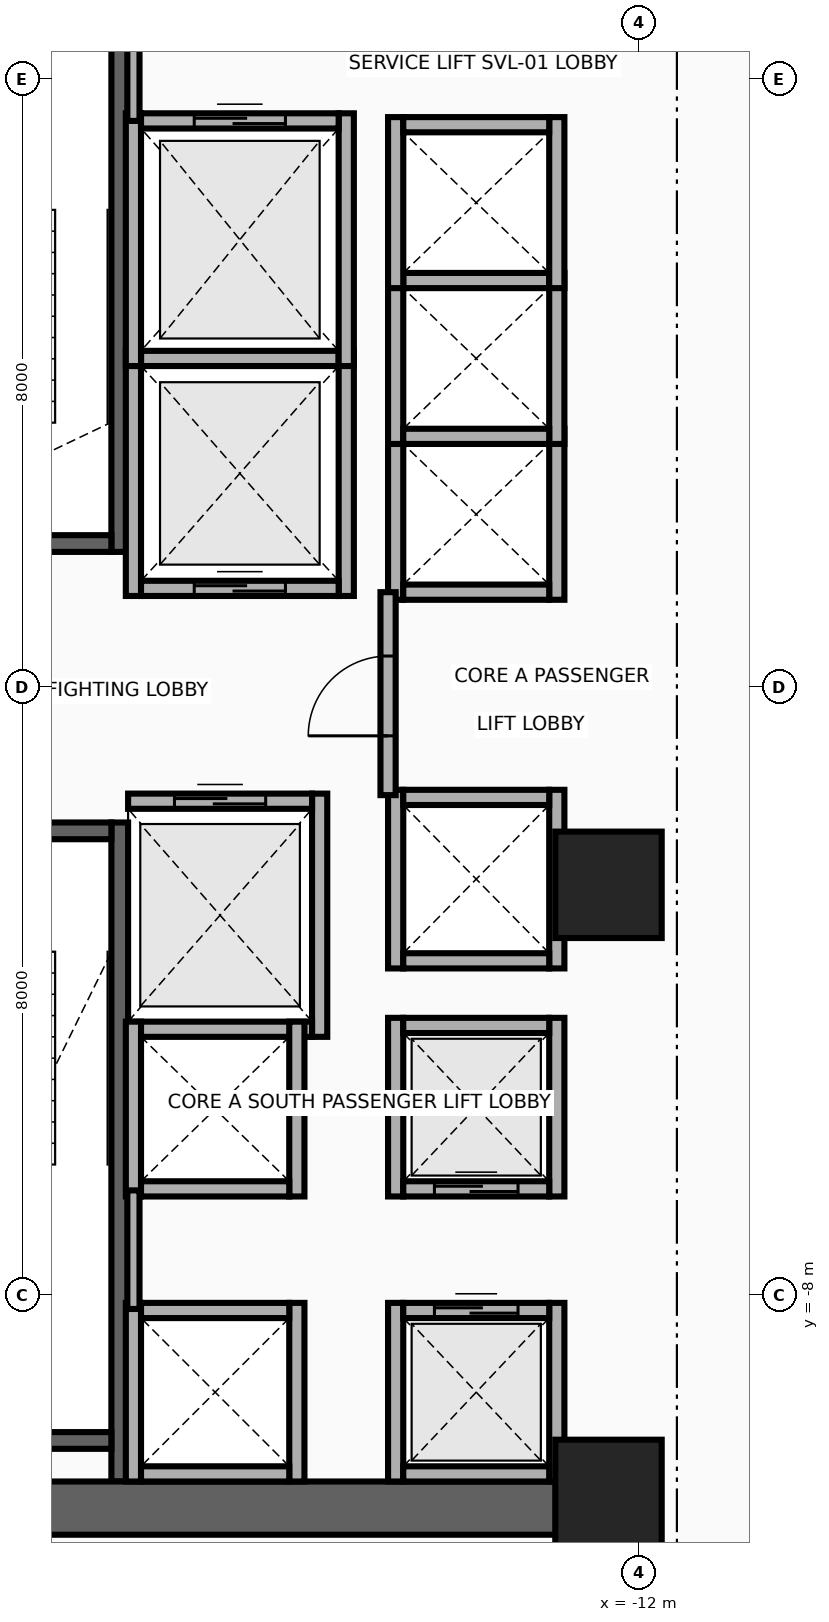
"""IFC4 building model, lengths in metres.
Left out: names, types, materials, properties, quantities, classifications, styles, units other than length and angle.
Written with IfcOpenShell. Run it as: python <this file> out.ifc"""

import sys

from ifc_helpers import new_model, si_unit, direction, frame, frame_2d, origin, origin_2d, place, context, subcontext, project, spatial, rectangle, extrude, source, transform, mapped, element, fill, save


model = new_model("IFC4")
c1 = context("Model", 3, precision=1e-05, world=origin(), true_north=direction((0.0, 1.0)))
c2 = subcontext(c1, "Body", "Model", "MODEL_VIEW")
j1 = project(units=[si_unit("LENGTHUNIT", "METRE"), si_unit("PLANEANGLEUNIT", "RADIAN")], contexts=[c1])
p1 = place(None, origin())
s1 = spatial("IfcSite", under=j1, at=p1, CompositionType="ELEMENT")
p2 = place(p1, origin())
s2 = spatial("IfcBuilding", under=s1, at=p2, CompositionType="ELEMENT")
p3 = place(p2, frame((0.0, 0.0, 37.1)))
s3 = spatial("IfcBuildingStorey", under=s2, at=p3, CompositionType="ELEMENT", Elevation=37.1)
p4 = place(p3, frame((-18.83, 1.78, 0.0), z_axis=(0.0, 0.0, 1.0), x_axis=(0.0, 1.0, 0.0)))
e1 = element("IfcWall", 1, at=p4, inside=s3, PredefinedType="SHEAR", context=c2, shape_type="SweptSolid", body=[
    extrude(rectangle(XDim=8.67, YDim=0.22, at=frame_2d((4.335, 0.0))), origin(), (0.0, 0.0, 1.0), 3.46),
])
p5 = place(p3, frame((-22.05, 1.89, 0.0), z_axis=(0.0, 0.0, 1.0), x_axis=(1.0, 0.0, 0.0)))
e2 = element("IfcWall", 2, at=p5, inside=s3, PredefinedType="SHEAR", context=c2, shape_type="SweptSolid", body=[
    extrude(rectangle(XDim=3.11, YDim=0.22, at=frame_2d((1.555, 0.0))), origin(), (0.0, 0.0, 1.0), 3.46),
])
p6 = place(p5, frame((1.0, 0.0, 0.0)))
e3 = element("IfcOpeningElement", 3, at=p6, cuts=e2, PredefinedType="OPENING", context=c2, shape_type="SweptSolid", body=[
    extrude(rectangle(XDim=1.1, YDim=2.15, at=frame_2d((0.55, 1.075))), frame((0.0, 0.125, 0.0), z_axis=(0.0, -1.0, 0.0), x_axis=(1.0, 0.0, 0.0)), (0.0, 0.0, 1.0), 0.25),
])
p7 = place(p3, frame((-18.83, -10.45, 0.0), z_axis=(0.0, 0.0, 1.0), x_axis=(0.0, 1.0, 0.0)))
e4 = element("IfcWall", 4, at=p7, inside=s3, PredefinedType="SHEAR", context=c2, shape_type="SweptSolid", body=[
    extrude(rectangle(XDim=8.67, YDim=0.22, at=frame_2d((4.335, 0.0))), origin(), (0.0, 0.0, 1.0), 3.46),
])
p8 = place(p3, frame((-22.05, -9.91, 0.0), z_axis=(0.0, 0.0, 1.0), x_axis=(1.0, 0.0, 0.0)))
e5 = element("IfcWall", 5, at=p8, inside=s3, PredefinedType="SHEAR", context=c2, shape_type="SweptSolid", body=[
    extrude(rectangle(XDim=3.11, YDim=0.22, at=frame_2d((1.555, 0.0))), origin(), (0.0, 0.0, 1.0), 3.46),
])
p9 = place(p3, frame((-22.05, -1.89, 0.0), z_axis=(0.0, 0.0, 1.0), x_axis=(1.0, 0.0, 0.0)))
e6 = element("IfcWall", 6, at=p9, inside=s3, PredefinedType="SHEAR", context=c2, shape_type="SweptSolid", body=[
    extrude(rectangle(XDim=3.11, YDim=0.22, at=frame_2d((1.555, 0.0))), origin(), (0.0, 0.0, 1.0), 3.46),
])
p10 = place(p9, frame((1.0, 0.0, 0.0)))
e7 = element("IfcOpeningElement", 7, at=p10, cuts=e6, PredefinedType="OPENING", context=c2, shape_type="SweptSolid", body=[
    extrude(rectangle(XDim=1.1, YDim=2.15, at=frame_2d((0.55, 1.075))), frame((0.0, 0.125, 0.0), z_axis=(0.0, -1.0, 0.0), x_axis=(1.0, 0.0, 0.0)), (0.0, 0.0, 1.0), 0.25),
])
p11 = place(p3, frame((-22.65, -10.8, 0.0), z_axis=(0.0, 0.0, 1.0), x_axis=(1.0, 0.0, 0.0)))
e8 = element("IfcWall", 8, at=p11, inside=s3, PredefinedType="SHEAR", context=c2, shape_type="SweptSolid", body=[
    extrude(rectangle(XDim=10.25, YDim=0.7, at=frame_2d((5.125, 0.0))), origin(), (0.0, 0.0, 1.0), 3.46),
])
m1 = source(origin(), c2, "Body", "SweptSolid", [
    extrude(rectangle(XDim=1.4, YDim=1.4, at=origin_2d()), origin(), (0.0, 0.0, 1.0), 3.7),
])
for number, where, z_axis, x_axis in (
    (9, (-12.4, -10.6, 0.0), (0.0, 0.0, 1.0), (1.0, 0.0, 0.0)),
    (10, (-12.4, -2.6, 0.0), (0.0, 0.0, 1.0), (1.0, 0.0, 0.0)),
):
    element("IfcColumn", number, at=place(p3, frame(where, z_axis=z_axis, x_axis=x_axis)), inside=s3, PredefinedType="COLUMN", context=c2, shape_type="MappedRepresentation", body=[
        mapped(m1, transform((0.0, 0.0, 0.0), x_axis=(1.0, 0.0, 0.0), y_axis=(0.0, 1.0, 0.0), z_axis=(0.0, 0.0, 1.0), scale=1.0)),
    ])
for number, where, z_axis, x_axis in (
    (11, (-18.65, 1.2, 0.0), (0.0, 0.0, 1.0), (0.0, 1.0, 0.0)),
    (12, (-15.85, 1.2, 0.0), (0.0, 0.0, 1.0), (0.0, 1.0, 0.0)),
):
    element("IfcWall", number, at=place(p3, frame(where, z_axis=z_axis, x_axis=x_axis)), inside=s3, PredefinedType="MOVABLE", context=c2, shape_type="SweptSolid", body=[
        extrude(rectangle(XDim=3.225, YDim=0.2, at=frame_2d((1.613, 0.0))), origin(), (0.0, 0.0, 1.0), 3.46),
    ])
p12 = place(p3, frame((-18.55, 1.3, 0.0), z_axis=(0.0, 0.0, 1.0), x_axis=(1.0, 0.0, 0.0)))
e13 = element("IfcWall", 13, at=p12, inside=s3, PredefinedType="MOVABLE", context=c2, shape_type="SweptSolid", body=[
    extrude(rectangle(XDim=2.6, YDim=0.2, at=frame_2d((1.3, 0.0))), origin(), (0.0, 0.0, 1.0), 3.46),
])
p13 = place(p12, frame((0.7, 0.0, 0.0)))
e14 = element("IfcOpeningElement", 14, at=p13, cuts=e13, PredefinedType="OPENING", context=c2, shape_type="SweptSolid", body=[
    extrude(rectangle(XDim=1.2, YDim=2.1, at=frame_2d((0.6, 1.05))), frame((0.0, 0.115, 0.0), z_axis=(0.0, -1.0, 0.0), x_axis=(1.0, 0.0, 0.0)), (0.0, 0.0, 1.0), 0.23),
])
p14 = place(p3, frame((-18.55, 4.325, 0.0), z_axis=(0.0, 0.0, 1.0), x_axis=(1.0, 0.0, 0.0)))
e15 = element("IfcWall", 15, at=p14, inside=s3, PredefinedType="MOVABLE", context=c2, shape_type="SweptSolid", body=[
    extrude(rectangle(XDim=2.6, YDim=0.2, at=frame_2d((1.3, 0.0))), origin(), (0.0, 0.0, 1.0), 3.46),
])
p15 = place(p3, frame((-16.2, -4.6, 0.0), z_axis=(0.0, 0.0, 1.0), x_axis=(0.0, 1.0, 0.0)))
e16 = element("IfcWall", 16, at=p15, inside=s3, PredefinedType="MOVABLE", context=c2, shape_type="SweptSolid", body=[
    extrude(rectangle(XDim=3.2, YDim=0.2, at=frame_2d((1.6, 0.0))), origin(), (0.0, 0.0, 1.0), 3.46),
])
p16 = place(p3, frame((-18.72, -4.5, 0.0), z_axis=(0.0, 0.0, 1.0), x_axis=(1.0, 0.0, 0.0)))
e17 = element("IfcWall", 17, at=p16, inside=s3, PredefinedType="MOVABLE", context=c2, shape_type="SweptSolid", body=[
    extrude(rectangle(XDim=2.42, YDim=0.2, at=frame_2d((1.21, 0.0))), origin(), (0.0, 0.0, 1.0), 3.46),
])
p17 = place(p3, frame((-18.72, -1.5, 0.0), z_axis=(0.0, 0.0, 1.0), x_axis=(1.0, 0.0, 0.0)))
e18 = element("IfcWall", 18, at=p17, inside=s3, PredefinedType="MOVABLE", context=c2, shape_type="SweptSolid", body=[
    extrude(rectangle(XDim=2.42, YDim=0.2, at=frame_2d((1.21, 0.0))), origin(), (0.0, 0.0, 1.0), 3.46),
])
p18 = place(p17, frame((0.61, 0.0, 0.0)))
e19 = element("IfcOpeningElement", 19, at=p18, cuts=e18, PredefinedType="OPENING", context=c2, shape_type="SweptSolid", body=[
    extrude(rectangle(XDim=1.2, YDim=2.1, at=frame_2d((0.6, 1.05))), frame((0.0, 0.115, 0.0), z_axis=(0.0, -1.0, 0.0), x_axis=(1.0, 0.0, 0.0)), (0.0, 0.0, 1.0), 0.23),
])
for number, where, z_axis, x_axis in (
    (20, (-18.65, 4.225, 0.0), (0.0, 0.0, 1.0), (0.0, 1.0, 0.0)),
    (21, (-15.85, 4.225, 0.0), (0.0, 0.0, 1.0), (0.0, 1.0, 0.0)),
):
    element("IfcWall", number, at=place(p3, frame(where, z_axis=z_axis, x_axis=x_axis)), inside=s3, PredefinedType="MOVABLE", context=c2, shape_type="SweptSolid", body=[
        extrude(rectangle(XDim=3.325, YDim=0.2, at=frame_2d((1.663, 0.0))), origin(), (0.0, 0.0, 1.0), 3.46),
    ])
p19 = place(p3, frame((-18.55, 7.45, 0.0), z_axis=(0.0, 0.0, 1.0), x_axis=(1.0, 0.0, 0.0)))
e22 = element("IfcWall", 22, at=p19, inside=s3, PredefinedType="MOVABLE", context=c2, shape_type="SweptSolid", body=[
    extrude(rectangle(XDim=2.6, YDim=0.2, at=frame_2d((1.3, 0.0))), origin(), (0.0, 0.0, 1.0), 3.46),
])
p20 = place(p19, frame((0.7, 0.0, 0.0)))
e23 = element("IfcOpeningElement", 23, at=p20, cuts=e22, PredefinedType="OPENING", context=c2, shape_type="SweptSolid", body=[
    extrude(rectangle(XDim=1.2, YDim=2.1, at=frame_2d((0.6, 1.05))), frame((0.0, 0.115, 0.0), z_axis=(0.0, -1.0, 0.0), x_axis=(1.0, 0.0, 0.0)), (0.0, 0.0, 1.0), 0.23),
])
for number, where, z_axis, x_axis in (
    (24, (-15.2, -10.45, 0.0), (0.0, 0.0, 1.0), (0.0, 1.0, 0.0)),
    (25, (-13.08, -10.45, 0.0), (0.0, 0.0, 1.0), (0.0, 1.0, 0.0)),
):
    element("IfcWall", number, at=place(p3, frame(where, z_axis=z_axis, x_axis=x_axis)), inside=s3, PredefinedType="MOVABLE", context=c2, shape_type="SweptSolid", body=[
        extrude(rectangle(XDim=2.35, YDim=0.2, at=frame_2d((1.175, 0.0))), origin(), (0.0, 0.0, 1.0), 2.583),
    ])
p21 = place(p3, frame((-15.1, -10.35, 0.0), z_axis=(0.0, 0.0, 1.0), x_axis=(1.0, 0.0, 0.0)))
e26 = element("IfcWall", 26, at=p21, inside=s3, PredefinedType="MOVABLE", context=c2, shape_type="SweptSolid", body=[
    extrude(rectangle(XDim=1.92, YDim=0.2, at=frame_2d((0.96, 0.0))), origin(), (0.0, 0.0, 1.0), 2.583),
])
p22 = place(p3, frame((-15.1, -8.2, 0.0), z_axis=(0.0, 0.0, 1.0), x_axis=(1.0, 0.0, 0.0)))
e27 = element("IfcWall", 27, at=p22, inside=s3, PredefinedType="MOVABLE", context=c2, shape_type="SweptSolid", body=[
    extrude(rectangle(XDim=1.92, YDim=0.2, at=frame_2d((0.96, 0.0))), origin(), (0.0, 0.0, 1.0), 3.46),
])
p23 = place(p22, frame((0.41, 0.0, 0.0)))
e28 = element("IfcOpeningElement", 28, at=p23, cuts=e27, PredefinedType="OPENING", context=c2, shape_type="SweptSolid", body=[
    extrude(rectangle(XDim=1.1, YDim=2.1, at=frame_2d((0.55, 1.05))), frame((0.0, 0.115, 0.0), z_axis=(0.0, -1.0, 0.0), x_axis=(1.0, 0.0, 0.0)), (0.0, 0.0, 1.0), 0.23),
])
for number, where, z_axis, x_axis in (
    (29, (-15.2, -6.7, 0.0), (0.0, 0.0, 1.0), (0.0, 1.0, 0.0)),
    (30, (-13.08, -6.7, 0.0), (0.0, 0.0, 1.0), (0.0, 1.0, 0.0)),
):
    element("IfcWall", number, at=place(p3, frame(where, z_axis=z_axis, x_axis=x_axis)), inside=s3, PredefinedType="MOVABLE", context=c2, shape_type="SweptSolid", body=[
        extrude(rectangle(XDim=2.35, YDim=0.2, at=frame_2d((1.175, 0.0))), origin(), (0.0, 0.0, 1.0), 3.46),
    ])
p24 = place(p3, frame((-15.1, -6.6, 0.0), z_axis=(0.0, 0.0, 1.0), x_axis=(1.0, 0.0, 0.0)))
e31 = element("IfcWall", 31, at=p24, inside=s3, PredefinedType="MOVABLE", context=c2, shape_type="SweptSolid", body=[
    extrude(rectangle(XDim=1.92, YDim=0.2, at=frame_2d((0.96, 0.0))), origin(), (0.0, 0.0, 1.0), 3.46),
])
p25 = place(p24, frame((0.41, 0.0, 0.0)))
e32 = element("IfcOpeningElement", 32, at=p25, cuts=e31, PredefinedType="OPENING", context=c2, shape_type="SweptSolid", body=[
    extrude(rectangle(XDim=1.1, YDim=2.1, at=frame_2d((0.55, 1.05))), frame((0.0, 0.115, 0.0), z_axis=(0.0, -1.0, 0.0), x_axis=(1.0, 0.0, 0.0)), (0.0, 0.0, 1.0), 0.23),
])
p26 = place(p3, frame((-15.1, -4.45, 0.0), z_axis=(0.0, 0.0, 1.0), x_axis=(1.0, 0.0, 0.0)))
e33 = element("IfcWall", 33, at=p26, inside=s3, PredefinedType="MOVABLE", context=c2, shape_type="SweptSolid", body=[
    extrude(rectangle(XDim=1.92, YDim=0.2, at=frame_2d((0.96, 0.0))), origin(), (0.0, 0.0, 1.0), 3.46),
])
for number, where, z_axis, x_axis in (
    (34, (-18.65, -10.45, 0.0), (0.0, 0.0, 1.0), (0.0, 1.0, 0.0)),
    (35, (-16.5, -10.45, 0.0), (0.0, 0.0, 1.0), (0.0, 1.0, 0.0)),
):
    element("IfcWall", number, at=place(p3, frame(where, z_axis=z_axis, x_axis=x_axis)), inside=s3, PredefinedType="MOVABLE", context=c2, shape_type="SweptSolid", body=[
        extrude(rectangle(XDim=2.35, YDim=0.2, at=frame_2d((1.175, 0.0))), origin(), (0.0, 0.0, 1.0), 2.583),
    ])
p27 = place(p3, frame((-18.55, -10.35, 0.0), z_axis=(0.0, 0.0, 1.0), x_axis=(1.0, 0.0, 0.0)))
e36 = element("IfcWall", 36, at=p27, inside=s3, PredefinedType="MOVABLE", context=c2, shape_type="SweptSolid", body=[
    extrude(rectangle(XDim=1.95, YDim=0.2, at=frame_2d((0.975, 0.0))), origin(), (0.0, 0.0, 1.0), 2.583),
])
p28 = place(p3, frame((-18.55, -8.2, 0.0), z_axis=(0.0, 0.0, 1.0), x_axis=(1.0, 0.0, 0.0)))
e37 = element("IfcWall", 37, at=p28, inside=s3, PredefinedType="MOVABLE", context=c2, shape_type="SweptSolid", body=[
    extrude(rectangle(XDim=1.95, YDim=0.2, at=frame_2d((0.975, 0.0))), origin(), (0.0, 0.0, 1.0), 3.46),
])
for number, where, z_axis, x_axis in (
    (38, (-15.2, 1.15, 0.0), (0.0, 0.0, 1.0), (0.0, 1.0, 0.0)),
    (39, (-13.08, 1.15, 0.0), (0.0, 0.0, 1.0), (0.0, 1.0, 0.0)),
):
    element("IfcWall", number, at=place(p3, frame(where, z_axis=z_axis, x_axis=x_axis)), inside=s3, PredefinedType="MOVABLE", context=c2, shape_type="SweptSolid", body=[
        extrude(rectangle(XDim=2.25, YDim=0.2, at=frame_2d((1.125, 0.0))), origin(), (0.0, 0.0, 1.0), 3.46),
    ])
p29 = place(p3, frame((-15.1, 1.25, 0.0), z_axis=(0.0, 0.0, 1.0), x_axis=(1.0, 0.0, 0.0)))
e40 = element("IfcWall", 40, at=p29, inside=s3, PredefinedType="MOVABLE", context=c2, shape_type="SweptSolid", body=[
    extrude(rectangle(XDim=1.92, YDim=0.2, at=frame_2d((0.96, 0.0))), origin(), (0.0, 0.0, 1.0), 3.46),
])
for number, where, z_axis, x_axis in (
    (41, (-15.2, 3.2, 0.0), (0.0, 0.0, 1.0), (0.0, 1.0, 0.0)),
    (42, (-13.08, 3.2, 0.0), (0.0, 0.0, 1.0), (0.0, 1.0, 0.0)),
):
    element("IfcWall", number, at=place(p3, frame(where, z_axis=z_axis, x_axis=x_axis)), inside=s3, PredefinedType="MOVABLE", context=c2, shape_type="SweptSolid", body=[
        extrude(rectangle(XDim=2.25, YDim=0.2, at=frame_2d((1.125, 0.0))), origin(), (0.0, 0.0, 1.0), 3.46),
    ])
for number, where, z_axis, x_axis in (
    (43, (-15.1, 3.3, 0.0), (0.0, 0.0, 1.0), (1.0, 0.0, 0.0)),
    (44, (-15.1, 5.35, 0.0), (0.0, 0.0, 1.0), (1.0, 0.0, 0.0)),
):
    element("IfcWall", number, at=place(p3, frame(where, z_axis=z_axis, x_axis=x_axis)), inside=s3, PredefinedType="MOVABLE", context=c2, shape_type="SweptSolid", body=[
        extrude(rectangle(XDim=1.92, YDim=0.2, at=frame_2d((0.96, 0.0))), origin(), (0.0, 0.0, 1.0), 3.46),
    ])
for number, where, z_axis, x_axis in (
    (45, (-15.2, 5.25, 0.0), (0.0, 0.0, 1.0), (0.0, 1.0, 0.0)),
    (46, (-13.08, 5.25, 0.0), (0.0, 0.0, 1.0), (0.0, 1.0, 0.0)),
):
    element("IfcWall", number, at=place(p3, frame(where, z_axis=z_axis, x_axis=x_axis)), inside=s3, PredefinedType="MOVABLE", context=c2, shape_type="SweptSolid", body=[
        extrude(rectangle(XDim=2.25, YDim=0.2, at=frame_2d((1.125, 0.0))), origin(), (0.0, 0.0, 1.0), 3.46),
    ])
p30 = place(p3, frame((-15.1, 7.4, 0.0), z_axis=(0.0, 0.0, 1.0), x_axis=(1.0, 0.0, 0.0)))
e47 = element("IfcWall", 47, at=p30, inside=s3, PredefinedType="MOVABLE", context=c2, shape_type="SweptSolid", body=[
    extrude(rectangle(XDim=1.92, YDim=0.2, at=frame_2d((0.96, 0.0))), origin(), (0.0, 0.0, 1.0), 3.46),
])
for number, where, z_axis, x_axis in (
    (48, (-18.65, -6.7, 0.0), (0.0, 0.0, 1.0), (0.0, 1.0, 0.0)),
    (49, (-16.5, -6.7, 0.0), (0.0, 0.0, 1.0), (0.0, 1.0, 0.0)),
):
    element("IfcWall", number, at=place(p3, frame(where, z_axis=z_axis, x_axis=x_axis)), inside=s3, PredefinedType="MOVABLE", context=c2, shape_type="SweptSolid", body=[
        extrude(rectangle(XDim=2.3, YDim=0.2, at=frame_2d((1.15, 0.0))), origin(), (0.0, 0.0, 1.0), 3.46),
    ])
p31 = place(p3, frame((-18.55, -6.6, 0.0), z_axis=(0.0, 0.0, 1.0), x_axis=(1.0, 0.0, 0.0)))
e50 = element("IfcWall", 50, at=p31, inside=s3, PredefinedType="MOVABLE", context=c2, shape_type="SweptSolid", body=[
    extrude(rectangle(XDim=1.95, YDim=0.2, at=frame_2d((0.975, 0.0))), origin(), (0.0, 0.0, 1.0), 3.46),
])
for number, where, z_axis, x_axis in (
    (51, (-15.2, -3.7, 0.0), (0.0, 0.0, 1.0), (0.0, 1.0, 0.0)),
    (52, (-13.08, -3.7, 0.0), (0.0, 0.0, 1.0), (0.0, 1.0, 0.0)),
):
    element("IfcWall", number, at=place(p3, frame(where, z_axis=z_axis, x_axis=x_axis)), inside=s3, PredefinedType="MOVABLE", context=c2, shape_type="SweptSolid", body=[
        extrude(rectangle(XDim=2.35, YDim=0.2, at=frame_2d((1.175, 0.0))), origin(), (0.0, 0.0, 1.0), 3.46),
    ])
for number, where, z_axis, x_axis in (
    (53, (-15.1, -3.6, 0.0), (0.0, 0.0, 1.0), (1.0, 0.0, 0.0)),
    (54, (-15.1, -1.45, 0.0), (0.0, 0.0, 1.0), (1.0, 0.0, 0.0)),
):
    element("IfcWall", number, at=place(p3, frame(where, z_axis=z_axis, x_axis=x_axis)), inside=s3, PredefinedType="MOVABLE", context=c2, shape_type="SweptSolid", body=[
        extrude(rectangle(XDim=1.92, YDim=0.2, at=frame_2d((0.96, 0.0))), origin(), (0.0, 0.0, 1.0), 3.46),
    ])
p32 = place(p3, frame((-15.3, -1.42, 0.0), z_axis=(0.0, 0.0, 1.0), x_axis=(0.0, 1.0, 0.0)))
e55 = element("IfcWall", 55, at=p32, inside=s3, PredefinedType="PARTITIONING", context=c2, shape_type="SweptSolid", body=[
    extrude(rectangle(XDim=2.67, YDim=0.2, at=frame_2d((1.335, 0.0))), origin(), (0.0, 0.0, 1.0), 3.46),
])
p33 = place(p32, frame((0.78, 0.0, 0.0)))
e56 = element("IfcOpeningElement", 56, at=p33, cuts=e55, PredefinedType="OPENING", context=c2, shape_type="SweptSolid", body=[
    extrude(rectangle(XDim=1.05, YDim=2.15, at=frame_2d((0.525, 1.075))), frame((0.0, 0.115, 0.0), z_axis=(0.0, -1.0, 0.0), x_axis=(1.0, 0.0, 0.0)), (0.0, 0.0, 1.0), 0.23),
])
p34 = place(p3, frame((-18.65, 7.45, 0.0), z_axis=(0.0, 0.0, 1.0), x_axis=(0.0, 1.0, 0.0)))
e57 = element("IfcWall", 57, at=p34, inside=s3, PredefinedType="PARTITIONING", context=c2, shape_type="SweptSolid", body=[
    extrude(rectangle(XDim=2.93, YDim=0.16, at=frame_2d((1.465, 0.0))), origin(), (0.0, 0.0, 1.0), 3.46),
])
p35 = place(p3, frame((-18.65, -8.18, 0.0), z_axis=(0.0, 0.0, 1.0), x_axis=(0.0, 1.0, 0.0)))
e58 = element("IfcWall", 58, at=p35, inside=s3, PredefinedType="PARTITIONING", context=c2, shape_type="SweptSolid", body=[
    extrude(rectangle(XDim=1.56, YDim=0.16, at=frame_2d((0.78, 0.0))), origin(), (0.0, 0.0, 1.0), 3.46),
])
p36 = place(p13, origin())
e59 = element("IfcDoor", 59, at=p36, inside=s3, OperationType="DOUBLE_DOOR_SLIDING", PredefinedType="DOOR", context=c2, shape_type="SweptSolid", body=[
    extrude(rectangle(XDim=1.2, YDim=2.1, at=frame_2d((0.6, 1.05))), frame((0.0, 0.025, 0.0), z_axis=(0.0, -1.0, 0.0), x_axis=(1.0, 0.0, 0.0)), (0.0, 0.0, 1.0), 0.05),
])
fill(e14, e59)
p37 = place(p18, origin())
e60 = element("IfcDoor", 60, at=p37, inside=s3, OperationType="DOUBLE_DOOR_SLIDING", PredefinedType="DOOR", context=c2, shape_type="SweptSolid", body=[
    extrude(rectangle(XDim=1.2, YDim=2.1, at=frame_2d((0.6, 1.05))), frame((0.0, 0.025, 0.0), z_axis=(0.0, -1.0, 0.0), x_axis=(1.0, 0.0, 0.0)), (0.0, 0.0, 1.0), 0.05),
])
fill(e19, e60)
p38 = place(p20, origin())
e61 = element("IfcDoor", 61, at=p38, inside=s3, OperationType="DOUBLE_DOOR_SLIDING", PredefinedType="DOOR", context=c2, shape_type="SweptSolid", body=[
    extrude(rectangle(XDim=1.2, YDim=2.1, at=frame_2d((0.6, 1.05))), frame((0.0, 0.025, 0.0), z_axis=(0.0, -1.0, 0.0), x_axis=(1.0, 0.0, 0.0)), (0.0, 0.0, 1.0), 0.05),
])
fill(e23, e61)
p39 = place(p23, origin())
e62 = element("IfcDoor", 62, at=p39, inside=s3, OperationType="DOUBLE_DOOR_SLIDING", PredefinedType="DOOR", context=c2, shape_type="SweptSolid", body=[
    extrude(rectangle(XDim=1.1, YDim=2.1, at=frame_2d((0.55, 1.05))), frame((0.0, 0.025, 0.0), z_axis=(0.0, -1.0, 0.0), x_axis=(1.0, 0.0, 0.0)), (0.0, 0.0, 1.0), 0.05),
])
fill(e28, e62)
p40 = place(p25, origin())
e63 = element("IfcDoor", 63, at=p40, inside=s3, OperationType="DOUBLE_DOOR_SLIDING", PredefinedType="DOOR", context=c2, shape_type="SweptSolid", body=[
    extrude(rectangle(XDim=1.1, YDim=2.1, at=frame_2d((0.55, 1.05))), frame((0.0, 0.025, 0.0), z_axis=(0.0, -1.0, 0.0), x_axis=(1.0, 0.0, 0.0)), (0.0, 0.0, 1.0), 0.05),
])
fill(e32, e63)
p41 = place(p33, origin())
e64 = element("IfcDoor", 64, at=p41, inside=s3, OperationType="SINGLE_SWING_RIGHT", PredefinedType="DOOR", context=c2, shape_type="SweptSolid", body=[
    extrude(rectangle(XDim=1.05, YDim=2.15, at=frame_2d((0.525, 1.075))), frame((0.0, 0.025, 0.0), z_axis=(0.0, -1.0, 0.0), x_axis=(1.0, 0.0, 0.0)), (0.0, 0.0, 1.0), 0.05),
])
fill(e56, e64)
save(model, sys.argv[1])
